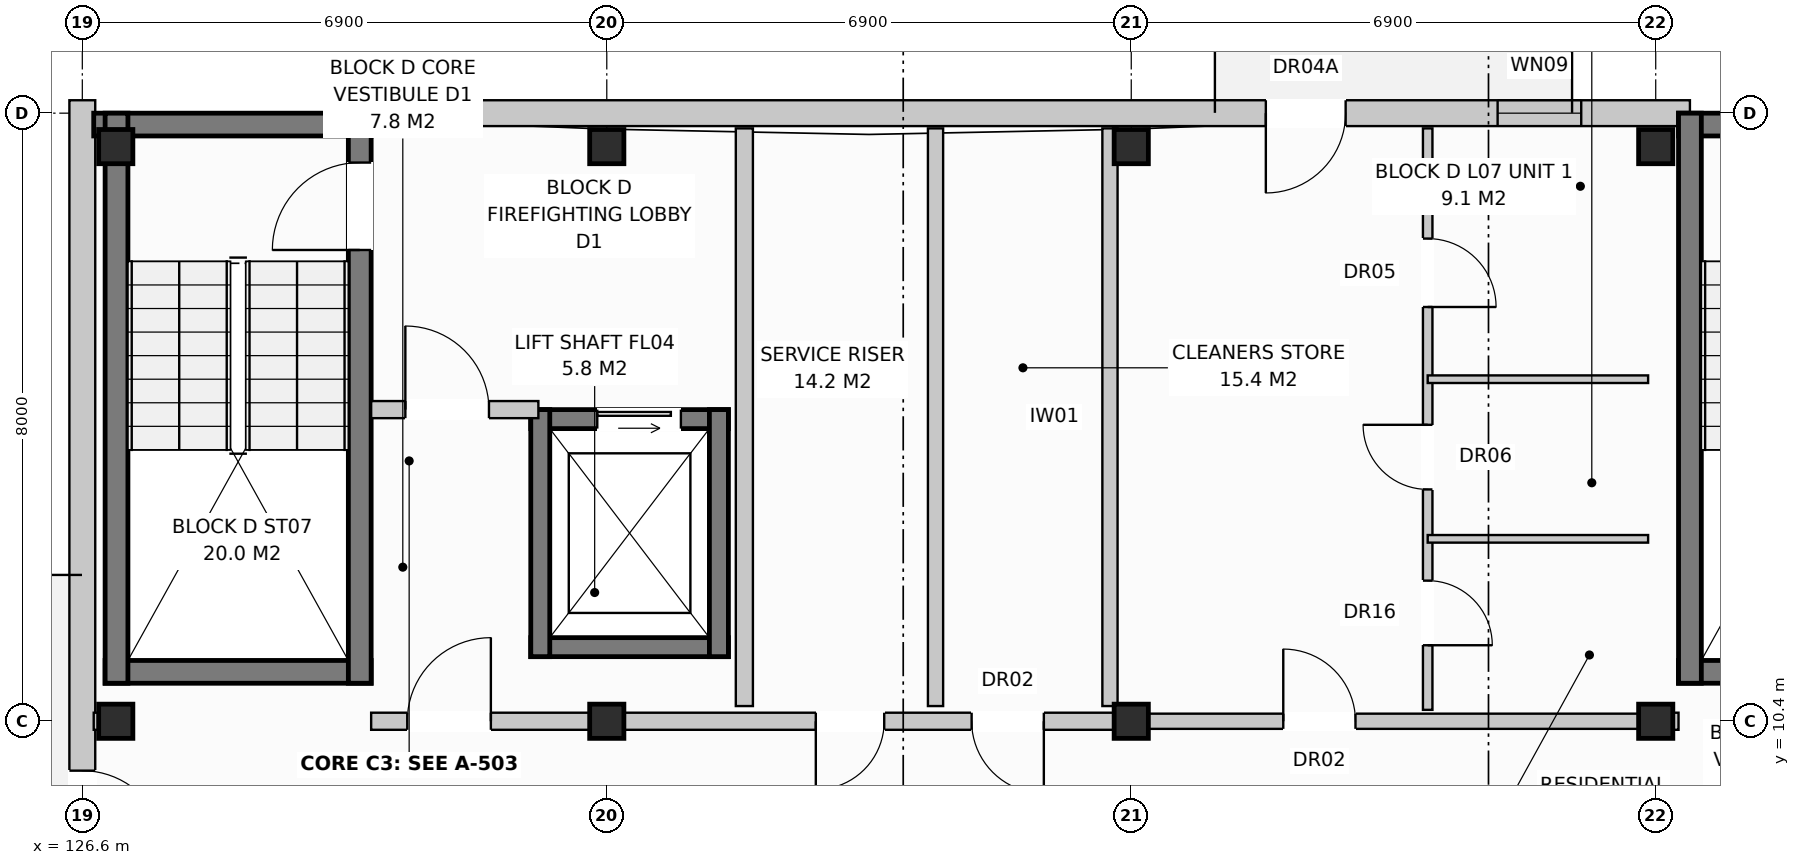
"""IFC4 building model, lengths in metres.
Left out: names, types, materials, properties, quantities, classifications, styles, units other than length and angle.
Written with IfcOpenShell. Run it as: python <this file> out.ifc"""

import sys

from ifc_helpers import new_model, si_unit, direction, frame, frame_2d, origin, origin_with_axes, origin_2d, place, context, subcontext, project, spatial, rectangle, extrude, element, fill, save


model = new_model("IFC4")
c1 = context("Model", 3, precision=1e-05, world=origin(), true_north=direction((0.0, 1.0)))
c2 = subcontext(c1, "Body", "Model", "MODEL_VIEW")
j1 = project(units=[si_unit("LENGTHUNIT", "METRE"), si_unit("PLANEANGLEUNIT", "RADIAN")], contexts=[c1])
p1 = place(None, origin())
s1 = spatial("IfcSite", under=j1, at=p1, CompositionType="ELEMENT")
p2 = place(p1, origin())
s2 = spatial("IfcBuilding", under=s1, at=p2, CompositionType="ELEMENT")
p3 = place(p2, frame((0.0, 0.0, 24.0)))
s3 = spatial("IfcBuildingStorey", under=s2, at=p3, CompositionType="ELEMENT", Elevation=24.0)
for number, where, z_axis, x_axis in (
    (1, (127.04, 10.4, 0.0), (0.0, 0.0, 1.0), (1.0, 0.0, 0.0)),
    (2, (127.04, 17.96, 0.0), (0.0, 0.0, 1.0), (1.0, 0.0, 0.0)),
    (3, (133.5, 10.4, 0.0), (0.0, 0.0, 1.0), (1.0, 0.0, 0.0)),
    (4, (133.5, 17.96, 0.0), (0.0, 0.0, 1.0), (1.0, 0.0, 0.0)),
    (5, (140.4, 10.4, 0.0), (0.0, 0.0, 1.0), (1.0, 0.0, 0.0)),
    (6, (140.4, 17.96, 0.0), (0.0, 0.0, 1.0), (1.0, 0.0, 0.0)),
    (7, (147.3, 10.4, 0.0), (0.0, 0.0, 1.0), (1.0, 0.0, 0.0)),
    (8, (147.3, 17.96, 0.0), (0.0, 0.0, 1.0), (1.0, 0.0, 0.0)),
):
    element("IfcColumn", number, at=place(p3, frame(where, z_axis=z_axis, x_axis=x_axis)), inside=s3, PredefinedType="COLUMN", context=c2, shape_type="SweptSolid", body=[
        extrude(rectangle(XDim=0.45, YDim=0.45, at=origin_2d()), origin(), (0.0, 0.0, 1.0), 3.2),
    ])
p4 = place(p3, frame((130.25, 18.4, 0.0), z_axis=(0.0, 0.0, 1.0), x_axis=(1.0, 0.0, 0.0)))
e9 = element("IfcWall", 9, at=p4, inside=s3, PredefinedType="STANDARD", context=c2, shape_type="SweptSolid", body=[
    extrude(rectangle(XDim=17.5, YDim=0.34, at=frame_2d((8.75, 0.0))), origin(), (0.0, 0.0, 1.0), 2.95),
])
p5 = place(p4, frame((11.921, 0.0, 0.0)))
e10 = element("IfcOpeningElement", 10, at=p5, cuts=e9, PredefinedType="OPENING", context=c2, shape_type="SweptSolid", body=[
    extrude(rectangle(XDim=1.05, YDim=2.12, at=frame_2d((0.525, 1.06))), frame((0.0, 0.182, 0.0), z_axis=(0.0, -1.0, 0.0), x_axis=(1.0, 0.0, 0.0)), (0.0, 0.0, 1.0), 0.364),
])
p6 = place(p4, frame((14.97, 0.0, 0.72)))
e11 = element("IfcOpeningElement", 11, at=p6, cuts=e9, PredefinedType="OPENING", context=c2, shape_type="SweptSolid", body=[
    extrude(rectangle(XDim=1.1, YDim=1.5, at=frame_2d((0.55, 0.75))), frame((0.0, 0.182, 0.0), z_axis=(0.0, -1.0, 0.0), x_axis=(1.0, 0.0, 0.0)), (0.0, 0.0, 1.0), 0.364),
])
p7 = place(p3, frame((126.6, -0.17, 0.0), z_axis=(0.0, 0.0, 1.0), x_axis=(0.0, 1.0, 0.0)))
e12 = element("IfcWall", 12, at=p7, inside=s3, PredefinedType="STANDARD", context=c2, shape_type="SweptSolid", body=[
    extrude(rectangle(XDim=18.74, YDim=0.34, at=frame_2d((9.37, 0.0))), origin(), (0.0, 0.0, 1.0), 2.95),
])
p8 = place(p7, frame((8.82, 0.0, 0.0)))
e13 = element("IfcOpeningElement", 13, at=p8, cuts=e12, PredefinedType="OPENING", context=c2, shape_type="SweptSolid", body=[
    extrude(rectangle(XDim=1.1, YDim=2.1, at=frame_2d((0.55, 1.05))), frame((0.0, 0.182, 0.0), z_axis=(0.0, -1.0, 0.0), x_axis=(1.0, 0.0, 0.0)), (0.0, 0.0, 1.0), 0.364),
])
p9 = place(p7, frame((1.72, 0.0, 0.72)))
e14 = element("IfcOpeningElement", 14, at=p9, cuts=e12, PredefinedType="OPENING", context=c2, shape_type="SweptSolid", body=[
    extrude(rectangle(XDim=1.1, YDim=1.5, at=frame_2d((0.55, 0.75))), frame((0.0, 0.182, 0.0), z_axis=(0.0, -1.0, 0.0), x_axis=(1.0, 0.0, 0.0)), (0.0, 0.0, 1.0), 0.364),
])
p10 = place(p3, frame((126.75, 18.25, 0.0), z_axis=(0.0, 0.0, 1.0), x_axis=(1.0, 0.0, 0.0)))
e15 = element("IfcWall", 15, at=p10, inside=s3, PredefinedType="SHEAR", context=c2, shape_type="SweptSolid", body=[
    extrude(rectangle(XDim=3.65, YDim=0.3, at=frame_2d((1.825, 0.0))), origin(), (0.0, 0.0, 1.0), 2.95),
])
p11 = place(p3, frame((126.9, 11.05, 0.0), z_axis=(0.0, 0.0, 1.0), x_axis=(1.0, 0.0, 0.0)))
e16 = element("IfcWall", 16, at=p11, inside=s3, PredefinedType="SHEAR", context=c2, shape_type="SweptSolid", body=[
    extrude(rectangle(XDim=3.5, YDim=0.3, at=frame_2d((1.75, 0.0))), origin(), (0.0, 0.0, 1.0), 2.95),
])
p12 = place(p3, frame((127.05, 10.9, 0.0), z_axis=(0.0, 0.0, 1.0), x_axis=(0.0, 1.0, 0.0)))
e17 = element("IfcWall", 17, at=p12, inside=s3, PredefinedType="SHEAR", context=c2, shape_type="SweptSolid", body=[
    extrude(rectangle(XDim=7.5, YDim=0.3, at=frame_2d((3.75, 0.0))), origin(), (0.0, 0.0, 1.0), 2.95),
])
p13 = place(p3, frame((130.25, 10.9, 0.0), z_axis=(0.0, 0.0, 1.0), x_axis=(0.0, 1.0, 0.0)))
e18 = element("IfcWall", 18, at=p13, inside=s3, PredefinedType="SHEAR", context=c2, shape_type="SweptSolid", body=[
    extrude(rectangle(XDim=7.5, YDim=0.3, at=frame_2d((3.75, 0.0))), origin(), (0.0, 0.0, 1.0), 2.95),
])
p14 = place(p13, frame((5.7, 0.0, 0.0)))
e19 = element("IfcOpeningElement", 19, at=p14, cuts=e18, PredefinedType="OPENING", context=c2, shape_type="SweptSolid", body=[
    extrude(rectangle(XDim=1.15, YDim=2.15, at=frame_2d((0.575, 1.075))), frame((0.0, 0.162, 0.0), z_axis=(0.0, -1.0, 0.0), x_axis=(1.0, 0.0, 0.0)), (0.0, 0.0, 1.0), 0.324),
])
p15 = place(p3, frame((132.5, 14.375, 0.0), z_axis=(0.0, 0.0, 1.0), x_axis=(1.0, 0.0, 0.0)))
e20 = element("IfcWall", 20, at=p15, inside=s3, PredefinedType="SHEAR", context=c2, shape_type="SweptSolid", body=[
    extrude(rectangle(XDim=2.6, YDim=0.25, at=frame_2d((1.3, 0.0))), origin(), (0.0, 0.0, 1.0), 2.95),
])
p16 = place(p15, frame((0.875, 0.0, 0.0)))
e21 = element("IfcOpeningElement", 21, at=p16, cuts=e20, PredefinedType="OPENING", context=c2, shape_type="SweptSolid", body=[
    extrude(rectangle(XDim=1.1, YDim=2.1, at=frame_2d((0.55, 1.05))), frame((0.0, 0.137, 0.0), z_axis=(0.0, -1.0, 0.0), x_axis=(1.0, 0.0, 0.0)), (0.0, 0.0, 1.0), 0.274),
])
p17 = place(p3, frame((132.5, 11.375, 0.0), z_axis=(0.0, 0.0, 1.0), x_axis=(1.0, 0.0, 0.0)))
e22 = element("IfcWall", 22, at=p17, inside=s3, PredefinedType="SHEAR", context=c2, shape_type="SweptSolid", body=[
    extrude(rectangle(XDim=2.6, YDim=0.25, at=frame_2d((1.3, 0.0))), origin(), (0.0, 0.0, 1.0), 2.95),
])
for number, where, z_axis, x_axis in (
    (23, (132.625, 11.25, 0.0), (0.0, 0.0, 1.0), (0.0, 1.0, 0.0)),
    (24, (134.975, 11.25, 0.0), (0.0, 0.0, 1.0), (0.0, 1.0, 0.0)),
):
    element("IfcWall", number, at=place(p3, frame(where, z_axis=z_axis, x_axis=x_axis)), inside=s3, PredefinedType="SHEAR", context=c2, shape_type="SweptSolid", body=[
        extrude(rectangle(XDim=3.25, YDim=0.25, at=frame_2d((1.625, 0.0))), origin(), (0.0, 0.0, 1.0), 2.95),
    ])
p18 = place(p3, frame((135.31, 10.6, 0.0), z_axis=(0.0, 0.0, 1.0), x_axis=(0.0, 1.0, 0.0)))
e25 = element("IfcWall", 25, at=p18, inside=s3, PredefinedType="PARTITIONING", context=c2, shape_type="SweptSolid", body=[
    extrude(rectangle(XDim=7.6, YDim=0.225, at=frame_2d((3.8, 0.0))), origin(), (0.0, 0.0, 1.0), 2.95),
])
p19 = place(p3, frame((130.4, 14.5, 0.0), z_axis=(0.0, 0.0, 1.0), x_axis=(1.0, 0.0, 0.0)))
e26 = element("IfcWall", 26, at=p19, inside=s3, PredefinedType="PARTITIONING", context=c2, shape_type="SweptSolid", body=[
    extrude(rectangle(XDim=2.2, YDim=0.225, at=frame_2d((1.1, 0.0))), origin(), (0.0, 0.0, 1.0), 2.95),
])
p20 = place(p19, frame((0.45, 0.0, 0.0)))
e27 = element("IfcOpeningElement", 27, at=p20, cuts=e26, PredefinedType="OPENING", context=c2, shape_type="SweptSolid", body=[
    extrude(rectangle(XDim=1.1, YDim=2.15, at=frame_2d((0.55, 1.075))), frame((0.0, 0.125, 0.0), z_axis=(0.0, -1.0, 0.0), x_axis=(1.0, 0.0, 0.0)), (0.0, 0.0, 1.0), 0.249),
])
p21 = place(p3, frame((126.75, 10.4, 0.0), z_axis=(0.0, 0.0, 1.0), x_axis=(1.0, 0.0, 0.0)))
e28 = element("IfcWall", 28, at=p21, inside=s3, PredefinedType="PARTITIONING", context=c2, shape_type="SweptSolid", body=[
    extrude(rectangle(XDim=0.15, YDim=0.225, at=frame_2d((0.075, 0.0))), origin(), (0.0, 0.0, 1.0), 2.95),
])
for number, where, z_axis, x_axis in (
    (29, (137.825, 10.6, 0.0), (0.0, 0.0, 1.0), (0.0, 1.0, 0.0)),
    (30, (140.12, 10.6, 0.0), (0.0, 0.0, 1.0), (0.0, 1.0, 0.0)),
):
    element("IfcWall", number, at=place(p3, frame(where, z_axis=z_axis, x_axis=x_axis)), inside=s3, PredefinedType="PARTITIONING", context=c2, shape_type="SweptSolid", body=[
        extrude(rectangle(XDim=7.6, YDim=0.2, at=frame_2d((3.8, 0.0))), origin(), (0.0, 0.0, 1.0), 2.95),
    ])
p22 = place(p3, frame((130.4, 10.4, 0.0), z_axis=(0.0, 0.0, 1.0), x_axis=(1.0, 0.0, 0.0)))
e31 = element("IfcWall", 31, at=p22, inside=s3, PredefinedType="PARTITIONING", context=c2, shape_type="SweptSolid", body=[
    extrude(rectangle(XDim=10.0, YDim=0.225, at=frame_2d((5.0, 0.0))), origin(), (0.0, 0.0, 1.0), 2.39),
])
p23 = place(p22, frame((0.475, 0.0, 0.0)))
e32 = element("IfcOpeningElement", 32, at=p23, cuts=e31, PredefinedType="OPENING", context=c2, shape_type="SweptSolid", body=[
    extrude(rectangle(XDim=1.1, YDim=2.15, at=frame_2d((0.55, 1.075))), frame((0.0, 0.125, 0.0), z_axis=(0.0, -1.0, 0.0), x_axis=(1.0, 0.0, 0.0)), (0.0, 0.0, 1.0), 0.249),
])
p24 = place(p22, frame((5.85, 0.0, 0.0)))
e33 = element("IfcOpeningElement", 33, at=p24, cuts=e31, PredefinedType="OPENING", context=c2, shape_type="SweptSolid", body=[
    extrude(rectangle(XDim=0.9, YDim=2.1, at=frame_2d((0.45, 1.05))), frame((0.0, 0.125, 0.0), z_axis=(0.0, -1.0, 0.0), x_axis=(1.0, 0.0, 0.0)), (0.0, 0.0, 1.0), 0.249),
])
p25 = place(p22, frame((7.9, 0.0, 0.0)))
e34 = element("IfcOpeningElement", 34, at=p25, cuts=e31, PredefinedType="OPENING", context=c2, shape_type="SweptSolid", body=[
    extrude(rectangle(XDim=0.95, YDim=2.15, at=frame_2d((0.475, 1.075))), frame((0.0, 0.125, 0.0), z_axis=(0.0, -1.0, 0.0), x_axis=(1.0, 0.0, 0.0)), (0.0, 0.0, 1.0), 0.249),
])
for number, where, z_axis, x_axis in (
    (35, (147.6, 18.25, 0.0), (0.0, 0.0, 1.0), (1.0, 0.0, 0.0)),
    (36, (147.6, 11.05, 0.0), (0.0, 0.0, 1.0), (1.0, 0.0, 0.0)),
):
    element("IfcWall", number, at=place(p3, frame(where, z_axis=z_axis, x_axis=x_axis)), inside=s3, PredefinedType="SHEAR", context=c2, shape_type="SweptSolid", body=[
        extrude(rectangle(XDim=3.5, YDim=0.3, at=frame_2d((1.75, 0.0))), origin(), (0.0, 0.0, 1.0), 2.95),
    ])
p26 = place(p3, frame((147.75, 10.9, 0.0), z_axis=(0.0, 0.0, 1.0), x_axis=(0.0, 1.0, 0.0)))
e37 = element("IfcWall", 37, at=p26, inside=s3, PredefinedType="SHEAR", context=c2, shape_type="SweptSolid", body=[
    extrude(rectangle(XDim=7.5, YDim=0.3, at=frame_2d((3.75, 0.0))), origin(), (0.0, 0.0, 1.0), 2.95),
])
p27 = place(p3, frame((147.3, 10.4, 0.0), z_axis=(0.0, 0.0, 1.0), x_axis=(1.0, 0.0, 0.0)))
e38 = element("IfcWall", 38, at=p27, inside=s3, PredefinedType="PARTITIONING", context=c2, shape_type="SweptSolid", body=[
    extrude(rectangle(XDim=0.3, YDim=0.225, at=frame_2d((0.15, 0.0))), origin(), (0.0, 0.0, 1.0), 2.95),
])
p28 = place(p3, frame((140.4, 10.4, 0.0), z_axis=(0.0, 0.0, 1.0), x_axis=(1.0, 0.0, 0.0)))
e39 = element("IfcWall", 39, at=p28, inside=s3, PredefinedType="PARTITIONING", context=c2, shape_type="SweptSolid", body=[
    extrude(rectangle(XDim=6.9, YDim=0.2, at=frame_2d((3.45, 0.0))), origin(), (0.0, 0.0, 1.0), 2.39),
])
p29 = place(p28, frame((2.0, 0.0, 0.0)))
e40 = element("IfcOpeningElement", 40, at=p29, cuts=e39, PredefinedType="OPENING", context=c2, shape_type="SweptSolid", body=[
    extrude(rectangle(XDim=0.95, YDim=2.15, at=frame_2d((0.475, 1.075))), frame((0.0, 0.112, 0.0), z_axis=(0.0, -1.0, 0.0), x_axis=(1.0, 0.0, 0.0)), (0.0, 0.0, 1.0), 0.224),
])
p30 = place(p3, frame((144.3, 10.55, 0.0), z_axis=(0.0, 0.0, 1.0), x_axis=(0.0, 1.0, 0.0)))
e41 = element("IfcWall", 41, at=p30, inside=s3, PredefinedType="PARTITIONING", context=c2, shape_type="SweptSolid", body=[
    extrude(rectangle(XDim=7.65, YDim=0.125, at=frame_2d((3.825, 0.0))), origin(), (0.0, 0.0, 1.0), 2.95),
])
p31 = place(p30, frame((0.85, 0.0, 0.0)))
e42 = element("IfcOpeningElement", 42, at=p31, cuts=e41, PredefinedType="OPENING", context=c2, shape_type="SweptSolid", body=[
    extrude(rectangle(XDim=0.85, YDim=2.1, at=frame_2d((0.425, 1.05))), frame((0.0, 0.074, 0.0), z_axis=(0.0, -1.0, 0.0), x_axis=(1.0, 0.0, 0.0)), (0.0, 0.0, 1.0), 0.149),
])
p32 = place(p30, frame((2.9, 0.0, 0.0)))
e43 = element("IfcOpeningElement", 43, at=p32, cuts=e41, PredefinedType="OPENING", context=c2, shape_type="SweptSolid", body=[
    extrude(rectangle(XDim=0.85, YDim=2.05, at=frame_2d((0.425, 1.025))), frame((0.0, 0.074, 0.0), z_axis=(0.0, -1.0, 0.0), x_axis=(1.0, 0.0, 0.0)), (0.0, 0.0, 1.0), 0.149),
])
p33 = place(p30, frame((5.3, 0.0, 0.0)))
e44 = element("IfcOpeningElement", 44, at=p33, cuts=e41, PredefinedType="OPENING", context=c2, shape_type="SweptSolid", body=[
    extrude(rectangle(XDim=0.9, YDim=2.1, at=frame_2d((0.45, 1.05))), frame((0.0, 0.074, 0.0), z_axis=(0.0, -1.0, 0.0), x_axis=(1.0, 0.0, 0.0)), (0.0, 0.0, 1.0), 0.149),
])
for number, where, z_axis, x_axis in (
    (45, (144.3, 12.8, 0.0), (0.0, 0.0, 1.0), (1.0, 0.0, 0.0)),
    (46, (144.3, 14.9, 0.0), (0.0, 0.0, 1.0), (1.0, 0.0, 0.0)),
):
    element("IfcWall", number, at=place(p3, frame(where, z_axis=z_axis, x_axis=x_axis)), inside=s3, PredefinedType="PARTITIONING", context=c2, shape_type="SweptSolid", body=[
        extrude(rectangle(XDim=2.9, YDim=0.1, at=frame_2d((1.45, 0.0))), origin(), (0.0, 0.0, 1.0), 2.95),
    ])
p34 = place(p5, frame((1.05, 0.0, 0.0), z_axis=(0.0, 0.0, 1.0), x_axis=(-1.0, 0.0, 0.0)))
e47 = element("IfcDoor", 47, at=p34, inside=s3, OperationType="SINGLE_SWING_LEFT", PredefinedType="DOOR", context=c2, shape_type="SweptSolid", body=[
    extrude(rectangle(XDim=1.05, YDim=2.12, at=frame_2d((0.525, 1.06))), frame((0.0, 0.025, 0.0), z_axis=(0.0, -1.0, 0.0), x_axis=(1.0, 0.0, 0.0)), (0.0, 0.0, 1.0), 0.05),
])
fill(e10, e47)
p35 = place(p6, origin_with_axes())
e48 = element("IfcWindow", 48, at=p35, inside=s3, PartitioningType="SINGLE_PANEL", PredefinedType="WINDOW", context=c2, shape_type="SweptSolid", body=[
    extrude(rectangle(XDim=1.1, YDim=1.5, at=frame_2d((0.55, 0.75))), frame((0.0, 0.03, 0.0), z_axis=(0.0, -1.0, 0.0), x_axis=(1.0, 0.0, 0.0)), (0.0, 0.0, 1.0), 0.06),
])
fill(e11, e48)
p36 = place(p8, frame((1.1, 0.0, 0.0), z_axis=(0.0, 0.0, 1.0), x_axis=(-1.0, 0.0, 0.0)))
e49 = element("IfcDoor", 49, at=p36, inside=s3, OperationType="SINGLE_SWING_LEFT", PredefinedType="DOOR", context=c2, shape_type="SweptSolid", body=[
    extrude(rectangle(XDim=1.1, YDim=2.1, at=frame_2d((0.55, 1.05))), frame((0.0, 0.025, 0.0), z_axis=(0.0, -1.0, 0.0), x_axis=(1.0, 0.0, 0.0)), (0.0, 0.0, 1.0), 0.05),
])
fill(e13, e49)
p37 = place(p14, origin_with_axes())
e50 = element("IfcDoor", 50, at=p37, inside=s3, OperationType="SINGLE_SWING_LEFT", PredefinedType="DOOR", context=c2, shape_type="SweptSolid", body=[
    extrude(rectangle(XDim=1.15, YDim=2.15, at=frame_2d((0.575, 1.075))), frame((0.0, 0.025, 0.0), z_axis=(0.0, -1.0, 0.0), x_axis=(1.0, 0.0, 0.0)), (0.0, 0.0, 1.0), 0.05),
])
fill(e19, e50)
p38 = place(p16, origin_with_axes())
e51 = element("IfcDoor", 51, at=p38, inside=s3, OperationType="SLIDING_TO_LEFT", PredefinedType="DOOR", context=c2, shape_type="SweptSolid", body=[
    extrude(rectangle(XDim=1.1, YDim=2.1, at=frame_2d((0.55, 1.05))), frame((0.0, 0.025, 0.0), z_axis=(0.0, -1.0, 0.0), x_axis=(1.0, 0.0, 0.0)), (0.0, 0.0, 1.0), 0.05),
])
fill(e21, e51)
p39 = place(p20, origin_with_axes())
e52 = element("IfcDoor", 52, at=p39, inside=s3, OperationType="SINGLE_SWING_LEFT", PredefinedType="DOOR", context=c2, shape_type="SweptSolid", body=[
    extrude(rectangle(XDim=1.1, YDim=2.15, at=frame_2d((0.55, 1.075))), frame((0.0, 0.025, 0.0), z_axis=(0.0, -1.0, 0.0), x_axis=(1.0, 0.0, 0.0)), (0.0, 0.0, 1.0), 0.05),
])
fill(e27, e52)
p40 = place(p23, origin_with_axes())
e53 = element("IfcDoor", 53, at=p40, inside=s3, OperationType="SINGLE_SWING_RIGHT", PredefinedType="DOOR", context=c2, shape_type="SweptSolid", body=[
    extrude(rectangle(XDim=1.1, YDim=2.15, at=frame_2d((0.55, 1.075))), frame((0.0, 0.025, 0.0), z_axis=(0.0, -1.0, 0.0), x_axis=(1.0, 0.0, 0.0)), (0.0, 0.0, 1.0), 0.05),
])
fill(e32, e53)
p41 = place(p24, frame((0.9, 0.0, 0.0), z_axis=(0.0, 0.0, 1.0), x_axis=(-1.0, 0.0, 0.0)))
e54 = element("IfcDoor", 54, at=p41, inside=s3, OperationType="SINGLE_SWING_LEFT", PredefinedType="DOOR", context=c2, shape_type="SweptSolid", body=[
    extrude(rectangle(XDim=0.9, YDim=2.1, at=frame_2d((0.45, 1.05))), frame((0.0, 0.025, 0.0), z_axis=(0.0, -1.0, 0.0), x_axis=(1.0, 0.0, 0.0)), (0.0, 0.0, 1.0), 0.05),
])
fill(e33, e54)
p42 = place(p25, frame((0.95, 0.0, 0.0), z_axis=(0.0, 0.0, 1.0), x_axis=(-1.0, 0.0, 0.0)))
e55 = element("IfcDoor", 55, at=p42, inside=s3, OperationType="SINGLE_SWING_RIGHT", PredefinedType="DOOR", context=c2, shape_type="SweptSolid", body=[
    extrude(rectangle(XDim=0.95, YDim=2.15, at=frame_2d((0.475, 1.075))), frame((0.0, 0.025, 0.0), z_axis=(0.0, -1.0, 0.0), x_axis=(1.0, 0.0, 0.0)), (0.0, 0.0, 1.0), 0.05),
])
fill(e34, e55)
p43 = place(p29, origin_with_axes())
e56 = element("IfcDoor", 56, at=p43, inside=s3, OperationType="SINGLE_SWING_LEFT", PredefinedType="DOOR", context=c2, shape_type="SweptSolid", body=[
    extrude(rectangle(XDim=0.95, YDim=2.15, at=frame_2d((0.475, 1.075))), frame((0.0, 0.025, 0.0), z_axis=(0.0, -1.0, 0.0), x_axis=(1.0, 0.0, 0.0)), (0.0, 0.0, 1.0), 0.05),
])
fill(e40, e56)
p44 = place(p31, frame((0.85, 0.0, 0.0), z_axis=(0.0, 0.0, 1.0), x_axis=(-1.0, 0.0, 0.0)))
e57 = element("IfcDoor", 57, at=p44, inside=s3, OperationType="SINGLE_SWING_LEFT", PredefinedType="DOOR", context=c2, shape_type="SweptSolid", body=[
    extrude(rectangle(XDim=0.85, YDim=2.1, at=frame_2d((0.425, 1.05))), frame((0.0, 0.025, 0.0), z_axis=(0.0, -1.0, 0.0), x_axis=(1.0, 0.0, 0.0)), (0.0, 0.0, 1.0), 0.05),
])
fill(e42, e57)
p45 = place(p32, origin_with_axes())
e58 = element("IfcDoor", 58, at=p45, inside=s3, OperationType="SINGLE_SWING_RIGHT", PredefinedType="DOOR", context=c2, shape_type="SweptSolid", body=[
    extrude(rectangle(XDim=0.85, YDim=2.05, at=frame_2d((0.425, 1.025))), frame((0.0, 0.025, 0.0), z_axis=(0.0, -1.0, 0.0), x_axis=(1.0, 0.0, 0.0)), (0.0, 0.0, 1.0), 0.05),
])
fill(e43, e58)
p46 = place(p33, frame((0.9, 0.0, 0.0), z_axis=(0.0, 0.0, 1.0), x_axis=(-1.0, 0.0, 0.0)))
e59 = element("IfcDoor", 59, at=p46, inside=s3, OperationType="SINGLE_SWING_LEFT", PredefinedType="DOOR", context=c2, shape_type="SweptSolid", body=[
    extrude(rectangle(XDim=0.9, YDim=2.1, at=frame_2d((0.45, 1.05))), frame((0.0, 0.025, 0.0), z_axis=(0.0, -1.0, 0.0), x_axis=(1.0, 0.0, 0.0)), (0.0, 0.0, 1.0), 0.05),
])
fill(e44, e59)
save(model, sys.argv[1])
